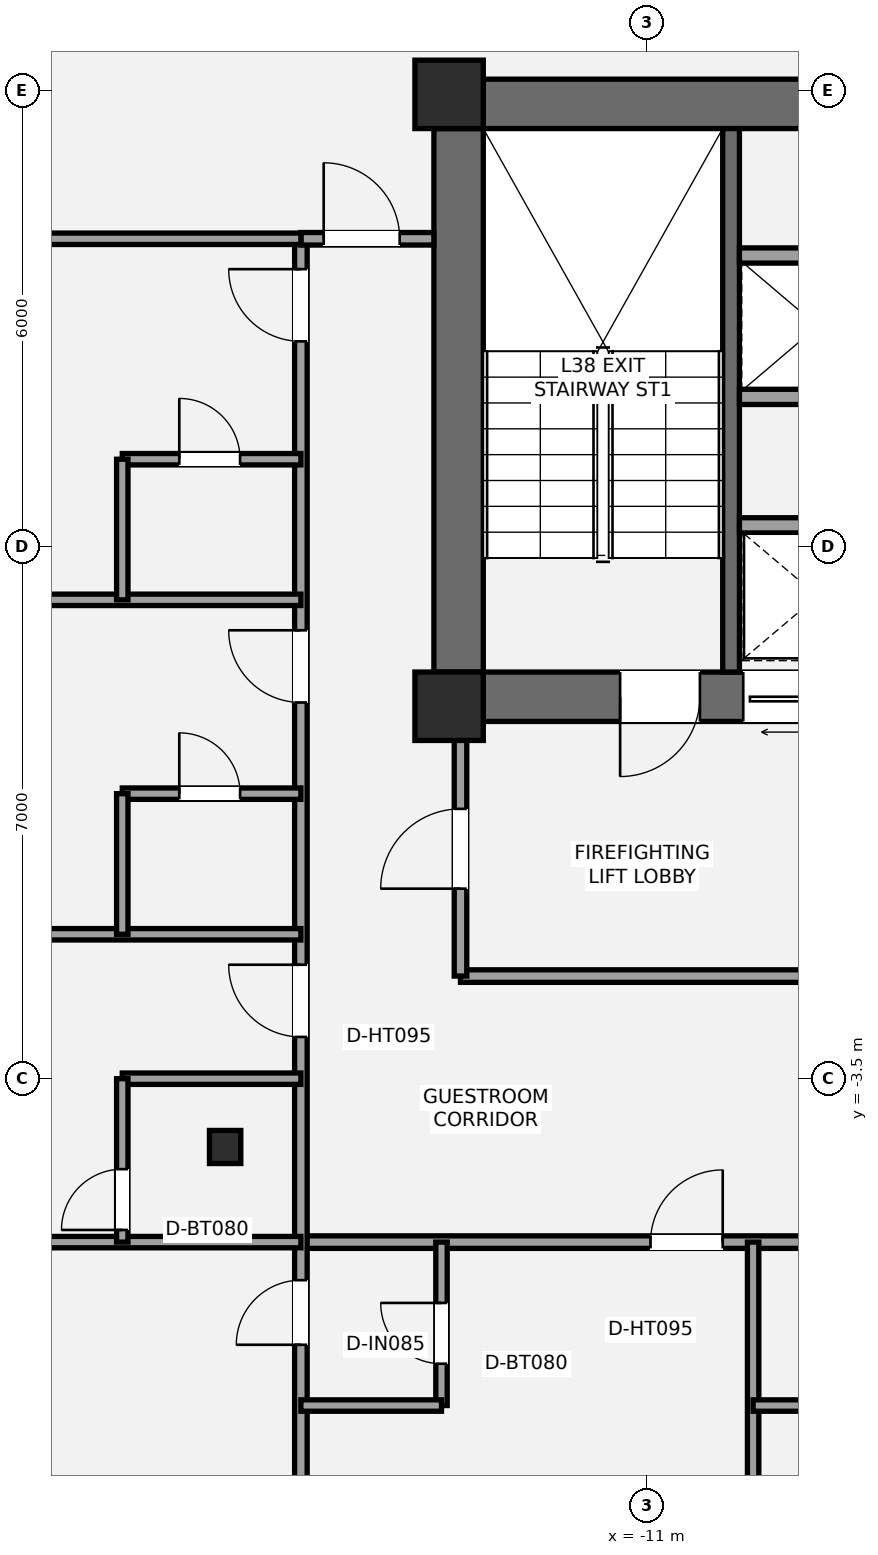
"""IFC4 building model, lengths in metres.
Left out: names, types, materials, properties, quantities, classifications, styles, units other than length and angle.
Written with IfcOpenShell. Run it as: python <this file> out.ifc"""

import sys

from ifc_helpers import new_model, si_unit, direction, frame, frame_2d, origin, origin_2d, place, context, subcontext, project, spatial, rectangle, i_section, extrude, element, fill, save


model = new_model("IFC4")
c1 = context("Model", 3, precision=1e-05, world=origin(), true_north=direction((0.0, 1.0)))
c2 = subcontext(c1, "Body", "Model", "MODEL_VIEW")
j1 = project(units=[si_unit("LENGTHUNIT", "METRE"), si_unit("PLANEANGLEUNIT", "RADIAN")], contexts=[c1])
p1 = place(None, origin())
s1 = spatial("IfcSite", under=j1, at=p1, CompositionType="ELEMENT")
p2 = place(p1, origin())
s2 = spatial("IfcBuilding", under=s1, at=p2, CompositionType="ELEMENT")
p3 = place(p2, frame((0.0, 0.0, 143.8)))
s3 = spatial("IfcBuildingStorey", under=s2, at=p3, CompositionType="ELEMENT", Elevation=143.8)
p4 = place(p3, frame((-13.475, 1.2, 0.0), z_axis=(0.0, 0.0, 1.0), x_axis=(0.0, 1.0, 0.0)))
e1 = element("IfcWall", 1, at=p4, inside=s3, PredefinedType="SHEAR", context=c2, shape_type="SweptSolid", body=[
    extrude(rectangle(XDim=8.45, YDim=0.65, at=frame_2d((4.225, 0.0))), origin(), (0.0, 0.0, 1.0), 3.2),
])
p5 = place(p3, frame((-13.8, 9.325, 0.0), z_axis=(0.0, 0.0, 1.0), x_axis=(1.0, 0.0, 0.0)))
e2 = element("IfcWall", 2, at=p5, inside=s3, PredefinedType="SHEAR", context=c2, shape_type="SweptSolid", body=[
    extrude(rectangle(XDim=9.325, YDim=0.65, at=frame_2d((4.663, 0.0))), origin(), (0.0, 0.0, 1.0), 3.2),
])
p6 = place(p3, frame((-4.875, 1.525, 0.0), z_axis=(0.0, 0.0, 1.0), x_axis=(-1.0, 0.0, 0.0)))
e3 = element("IfcWall", 3, at=p6, inside=s3, PredefinedType="SHEAR", context=c2, shape_type="SweptSolid", body=[
    extrude(rectangle(XDim=8.925, YDim=0.65, at=frame_2d((4.462, 0.0))), origin(), (0.0, 0.0, 1.0), 3.2),
])
p7 = place(p6, frame((5.425, 0.0, 0.0)))
e4 = element("IfcOpeningElement", 4, at=p7, cuts=e3, PredefinedType="OPENING", context=c2, shape_type="SweptSolid", body=[
    extrude(rectangle(XDim=1.05, YDim=2.15, at=frame_2d((0.525, 1.075))), frame((0.0, 0.335, 0.0), z_axis=(0.0, -1.0, 0.0), x_axis=(1.0, 0.0, 0.0)), (0.0, 0.0, 1.0), 0.67),
])
p8 = place(p6, frame((3.755, 0.0, 0.0)))
e5 = element("IfcOpeningElement", 5, at=p8, cuts=e3, PredefinedType="OPENING", context=c2, shape_type="SweptSolid", body=[
    extrude(rectangle(XDim=1.1, YDim=2.2, at=frame_2d((0.55, 1.1))), frame((0.0, 0.335, 0.0), z_axis=(0.0, -1.0, 0.0), x_axis=(1.0, 0.0, 0.0)), (0.0, 0.0, 1.0), 0.67),
])
p9 = place(p3, frame((-9.89, 1.85, 0.0), z_axis=(0.0, 0.0, 1.0), x_axis=(0.0, 1.0, 0.0)))
e6 = element("IfcWall", 6, at=p9, inside=s3, PredefinedType="SHEAR", context=c2, shape_type="SweptSolid", body=[
    extrude(rectangle(XDim=7.15, YDim=0.22, at=frame_2d((3.575, 0.0))), origin(), (0.0, 0.0, 1.0), 3.2),
])
for number, where, z_axis, x_axis in (
    (7, (-13.6, 1.4, 0.0), (0.0, 0.0, 1.0), (1.0, 0.0, 0.0)),
    (8, (-13.6, 9.45, 0.0), (0.0, 0.0, 1.0), (1.0, 0.0, 0.0)),
):
    element("IfcColumn", number, at=place(p3, frame(where, z_axis=z_axis, x_axis=x_axis)), inside=s3, PredefinedType="COLUMN", context=c2, shape_type="SweptSolid", body=[
        extrude(rectangle(XDim=0.9, YDim=0.9, at=origin_2d()), origin(), (0.0, 0.0, 1.0), 3.2),
    ])
p10 = place(p3, frame((-16.547, -4.398, 0.0), z_axis=(0.0, 0.0, 1.0), x_axis=(1.0, 0.0, 0.0)))
e9 = element("IfcColumn", 9, at=p10, inside=s3, PredefinedType="COLUMN", context=c2, shape_type="SweptSolid", body=[
    extrude(i_section(OverallWidth=0.412, OverallDepth=0.435, WebThickness=0.036, FlangeThickness=0.057, at=origin_2d()), origin(), (0.0, 0.0, 1.0), 3.2),
])
p11 = place(p3, frame((-13.45, -2.15, 0.0), z_axis=(0.0, 0.0, 1.0), x_axis=(1.0, 0.0, 0.0)))
e10 = element("IfcWall", 10, at=p11, inside=s3, PredefinedType="PARTITIONING", context=c2, shape_type="SweptSolid", body=[
    extrude(rectangle(XDim=6.25, YDim=0.165, at=frame_2d((3.125, 0.0))), origin(), (0.0, 0.0, 1.0), 2.473),
])
p12 = place(p3, frame((-13.45, -2.15, 0.0), z_axis=(0.0, 0.0, 1.0), x_axis=(0.0, 1.0, 0.0)))
e11 = element("IfcWall", 11, at=p12, inside=s3, PredefinedType="PARTITIONING", context=c2, shape_type="SweptSolid", body=[
    extrude(rectangle(XDim=3.4, YDim=0.165, at=frame_2d((1.7, 0.0))), origin(), (0.0, 0.0, 1.0), 2.473),
])
p13 = place(p12, frame((1.15, 0.0, 0.0)))
e12 = element("IfcOpeningElement", 12, at=p13, cuts=e11, PredefinedType="OPENING", context=c2, shape_type="SweptSolid", body=[
    extrude(rectangle(XDim=1.05, YDim=2.15, at=frame_2d((0.525, 1.075))), frame((0.0, 0.093, 0.0), z_axis=(0.0, -1.0, 0.0), x_axis=(1.0, 0.0, 0.0)), (0.0, 0.0, 1.0), 0.185),
])
for number, where, z_axis, x_axis in (
    (13, (-9.78, 3.78, 0.0), (0.0, 0.0, 1.0), (1.0, 0.0, 0.0)),
    (14, (-9.78, 5.47, 0.0), (0.0, 0.0, 1.0), (1.0, 0.0, 0.0)),
    (15, (-9.78, 7.33, 0.0), (0.0, 0.0, 1.0), (1.0, 0.0, 0.0)),
):
    element("IfcWall", number, at=place(p3, frame(where, z_axis=z_axis, x_axis=x_axis)), inside=s3, PredefinedType="SOLIDWALL", context=c2, shape_type="SweptSolid", body=[
        extrude(rectangle(XDim=4.255, YDim=0.2, at=frame_2d((2.127, 0.0))), origin(), (0.0, 0.0, 1.0), 3.02),
    ])
p14 = place(p3, frame((-15.55, -5.65, 0.0), z_axis=(0.0, 0.0, 1.0), x_axis=(1.0, 0.0, 0.0)))
e16 = element("IfcWall", 16, at=p14, inside=s3, PredefinedType="PARTITIONING", context=c2, shape_type="SweptSolid", body=[
    extrude(rectangle(XDim=31.1, YDim=0.165, at=frame_2d((15.55, 0.0))), origin(), (0.0, 0.0, 1.0), 2.398),
])
p15 = place(p14, frame((4.6, 0.0, 0.0)))
e17 = element("IfcOpeningElement", 17, at=p15, cuts=e16, PredefinedType="OPENING", context=c2, shape_type="SweptSolid", body=[
    extrude(rectangle(XDim=0.95, YDim=2.15, at=frame_2d((0.475, 1.075))), frame((0.0, 0.093, 0.0), z_axis=(0.0, -1.0, 0.0), x_axis=(1.0, 0.0, 0.0)), (0.0, 0.0, 1.0), 0.185),
])
p16 = place(p14, frame((11.0, 0.0, 0.0)))
e18 = element("IfcOpeningElement", 18, at=p16, cuts=e16, PredefinedType="OPENING", context=c2, shape_type="SweptSolid", body=[
    extrude(rectangle(XDim=0.95, YDim=2.15, at=frame_2d((0.475, 1.075))), frame((0.0, 0.093, 0.0), z_axis=(0.0, -1.0, 0.0), x_axis=(1.0, 0.0, 0.0)), (0.0, 0.0, 1.0), 0.185),
])
p17 = place(p14, frame((17.4, 0.0, 0.0)))
e19 = element("IfcOpeningElement", 19, at=p17, cuts=e16, PredefinedType="OPENING", context=c2, shape_type="SweptSolid", body=[
    extrude(rectangle(XDim=0.95, YDim=2.15, at=frame_2d((0.475, 1.075))), frame((0.0, 0.093, 0.0), z_axis=(0.0, -1.0, 0.0), x_axis=(1.0, 0.0, 0.0)), (0.0, 0.0, 1.0), 0.185),
])
p18 = place(p14, frame((23.8, 0.0, 0.0)))
e20 = element("IfcOpeningElement", 20, at=p18, cuts=e16, PredefinedType="OPENING", context=c2, shape_type="SweptSolid", body=[
    extrude(rectangle(XDim=0.95, YDim=2.15, at=frame_2d((0.475, 1.075))), frame((0.0, 0.093, 0.0), z_axis=(0.0, -1.0, 0.0), x_axis=(1.0, 0.0, 0.0)), (0.0, 0.0, 1.0), 0.185),
])
p19 = place(p14, frame((29.75, 0.0, 0.0)))
e21 = element("IfcOpeningElement", 21, at=p19, cuts=e16, PredefinedType="OPENING", context=c2, shape_type="SweptSolid", body=[
    extrude(rectangle(XDim=0.95, YDim=2.15, at=frame_2d((0.475, 1.075))), frame((0.0, 0.093, 0.0), z_axis=(0.0, -1.0, 0.0), x_axis=(1.0, 0.0, 0.0)), (0.0, 0.0, 1.0), 0.185),
])
p20 = place(p3, frame((-15.55, -13.965, 0.0), z_axis=(0.0, 0.0, 1.0), x_axis=(0.0, 1.0, 0.0)))
e22 = element("IfcWall", 22, at=p20, inside=s3, PredefinedType="PARTITIONING", context=c2, shape_type="SweptSolid", body=[
    extrude(rectangle(XDim=21.515, YDim=0.165, at=frame_2d((10.757, 0.0))), origin(), (0.0, 0.0, 1.0), 2.473),
])
p21 = place(p20, frame((6.964, 0.0, 0.0)))
e23 = element("IfcOpeningElement", 23, at=p21, cuts=e22, PredefinedType="OPENING", context=c2, shape_type="SweptSolid", body=[
    extrude(rectangle(XDim=0.85, YDim=2.1, at=frame_2d((0.425, 1.05))), frame((0.0, 0.093, 0.0), z_axis=(0.0, -1.0, 0.0), x_axis=(1.0, 0.0, 0.0)), (0.0, 0.0, 1.0), 0.185),
])
p22 = place(p20, frame((11.014, 0.0, 0.0)))
e24 = element("IfcOpeningElement", 24, at=p22, cuts=e22, PredefinedType="OPENING", context=c2, shape_type="SweptSolid", body=[
    extrude(rectangle(XDim=0.95, YDim=2.15, at=frame_2d((0.475, 1.075))), frame((0.0, 0.093, 0.0), z_axis=(0.0, -1.0, 0.0), x_axis=(1.0, 0.0, 0.0)), (0.0, 0.0, 1.0), 0.185),
])
p23 = place(p20, frame((15.414, 0.0, 0.0)))
e25 = element("IfcOpeningElement", 25, at=p23, cuts=e22, PredefinedType="OPENING", context=c2, shape_type="SweptSolid", body=[
    extrude(rectangle(XDim=0.95, YDim=2.15, at=frame_2d((0.475, 1.075))), frame((0.0, 0.093, 0.0), z_axis=(0.0, -1.0, 0.0), x_axis=(1.0, 0.0, 0.0)), (0.0, 0.0, 1.0), 0.185),
])
p24 = place(p20, frame((20.165, 0.0, 0.0)))
e26 = element("IfcOpeningElement", 26, at=p24, cuts=e22, PredefinedType="OPENING", context=c2, shape_type="SweptSolid", body=[
    extrude(rectangle(XDim=0.95, YDim=2.15, at=frame_2d((0.475, 1.075))), frame((0.0, 0.093, 0.0), z_axis=(0.0, -1.0, 0.0), x_axis=(1.0, 0.0, 0.0)), (0.0, 0.0, 1.0), 0.185),
])
p25 = place(p3, frame((-15.55, 7.55, 0.0), z_axis=(0.0, 0.0, 1.0), x_axis=(1.0, 0.0, 0.0)))
e27 = element("IfcWall", 27, at=p25, inside=s3, PredefinedType="PARTITIONING", context=c2, shape_type="SweptSolid", body=[
    extrude(rectangle(XDim=1.75, YDim=0.165, at=frame_2d((0.875, 0.0))), origin(), (0.0, 0.0, 1.0), 2.473),
])
p26 = place(p25, frame((0.3, 0.0, 0.0)))
e28 = element("IfcOpeningElement", 28, at=p26, cuts=e27, PredefinedType="OPENING", context=c2, shape_type="SweptSolid", body=[
    extrude(rectangle(XDim=1.0, YDim=2.15, at=frame_2d((0.5, 1.075))), frame((0.0, 0.093, 0.0), z_axis=(0.0, -1.0, 0.0), x_axis=(1.0, 0.0, 0.0)), (0.0, 0.0, 1.0), 0.185),
])
p27 = place(p3, frame((-22.804, 7.55, 0.0), z_axis=(0.0, 0.0, 1.0), x_axis=(1.0, 0.0, 0.0)))
e29 = element("IfcWall", 29, at=p27, inside=s3, PredefinedType="PLUMBINGWALL", context=c2, shape_type="SweptSolid", body=[
    extrude(rectangle(XDim=7.254, YDim=0.15, at=frame_2d((3.627, 0.0))), origin(), (0.0, 0.0, 1.0), 2.473),
])
p28 = place(p3, frame((-23.513, -5.65, 0.0), z_axis=(0.0, 0.0, 1.0), x_axis=(1.0, 0.0, 0.0)))
e30 = element("IfcWall", 30, at=p28, inside=s3, PredefinedType="PLUMBINGWALL", context=c2, shape_type="SweptSolid", body=[
    extrude(rectangle(XDim=7.963, YDim=0.15, at=frame_2d((3.981, 0.0))), origin(), (0.0, 0.0, 1.0), 2.473),
])
p29 = place(p3, frame((-9.6, -15.591, 0.0), z_axis=(0.0, 0.0, 1.0), x_axis=(0.0, 1.0, 0.0)))
e31 = element("IfcWall", 31, at=p29, inside=s3, PredefinedType="PLUMBINGWALL", context=c2, shape_type="SweptSolid", body=[
    extrude(rectangle(XDim=9.941, YDim=0.15, at=frame_2d((4.97, 0.0))), origin(), (0.0, 0.0, 1.0), 3.02),
])
p30 = place(p3, frame((-13.7, -7.8, 0.0), z_axis=(0.0, 0.0, 1.0), x_axis=(0.0, 1.0, 0.0)))
e32 = element("IfcWall", 32, at=p30, inside=s3, PredefinedType="PLUMBINGWALL", context=c2, shape_type="SweptSolid", body=[
    extrude(rectangle(XDim=2.15, YDim=0.15, at=frame_2d((1.075, 0.0))), origin(), (0.0, 0.0, 1.0), 3.02),
])
p31 = place(p30, frame((0.55, 0.0, 0.0)))
e33 = element("IfcOpeningElement", 33, at=p31, cuts=e32, PredefinedType="OPENING", context=c2, shape_type="SweptSolid", body=[
    extrude(rectangle(XDim=0.8, YDim=2.1, at=frame_2d((0.4, 1.05))), frame((0.0, 0.085, 0.0), z_axis=(0.0, -1.0, 0.0), x_axis=(1.0, 0.0, 0.0)), (0.0, 0.0, 1.0), 0.17),
])
for number, where, z_axis, x_axis in (
    (34, (-15.55, -7.8, 0.0), (0.0, 0.0, 1.0), (1.0, 0.0, 0.0)),
    (35, (-9.6, -7.8, 0.0), (0.0, 0.0, 1.0), (1.0, 0.0, 0.0)),
):
    element("IfcWall", number, at=place(p3, frame(where, z_axis=z_axis, x_axis=x_axis)), inside=s3, PredefinedType="PLUMBINGWALL", context=c2, shape_type="SweptSolid", body=[
        extrude(rectangle(XDim=1.85, YDim=0.15, at=frame_2d((0.925, 0.0))), origin(), (0.0, 0.0, 1.0), 3.02),
    ])
p32 = place(p3, frame((-24.184, -1.6, 0.0), z_axis=(0.0, 0.0, 1.0), x_axis=(1.0, 0.0, 0.0)))
e36 = element("IfcWall", 36, at=p32, inside=s3, PredefinedType="PLUMBINGWALL", context=c2, shape_type="SweptSolid", body=[
    extrude(rectangle(XDim=8.634, YDim=0.15, at=frame_2d((4.317, 0.0))), origin(), (0.0, 0.0, 1.0), 2.398),
])
p33 = place(p3, frame((-24.045, 2.8, 0.0), z_axis=(0.0, 0.0, 1.0), x_axis=(1.0, 0.0, 0.0)))
e37 = element("IfcWall", 37, at=p33, inside=s3, PredefinedType="PLUMBINGWALL", context=c2, shape_type="SweptSolid", body=[
    extrude(rectangle(XDim=8.495, YDim=0.15, at=frame_2d((4.247, 0.0))), origin(), (0.0, 0.0, 1.0), 2.473),
])
p34 = place(p3, frame((-17.9, -3.5, 0.0), z_axis=(0.0, 0.0, 1.0), x_axis=(1.0, 0.0, 0.0)))
e38 = element("IfcWall", 38, at=p34, inside=s3, PredefinedType="PLUMBINGWALL", context=c2, shape_type="SweptSolid", body=[
    extrude(rectangle(XDim=2.35, YDim=0.15, at=frame_2d((1.175, 0.0))), origin(), (0.0, 0.0, 1.0), 2.398),
])
p35 = place(p3, frame((-17.9, -5.65, 0.0), z_axis=(0.0, 0.0, 1.0), x_axis=(0.0, 1.0, 0.0)))
e39 = element("IfcWall", 39, at=p35, inside=s3, PredefinedType="PLUMBINGWALL", context=c2, shape_type="SweptSolid", body=[
    extrude(rectangle(XDim=2.15, YDim=0.15, at=frame_2d((1.075, 0.0))), origin(), (0.0, 0.0, 1.0), 2.473),
])
p36 = place(p35, frame((0.16, 0.0, 0.0)))
e40 = element("IfcOpeningElement", 40, at=p36, cuts=e39, PredefinedType="OPENING", context=c2, shape_type="SweptSolid", body=[
    extrude(rectangle(XDim=0.8, YDim=2.1, at=frame_2d((0.4, 1.05))), frame((0.0, 0.085, 0.0), z_axis=(0.0, -1.0, 0.0), x_axis=(1.0, 0.0, 0.0)), (0.0, 0.0, 1.0), 0.17),
])
p37 = place(p3, frame((-17.9, 0.25, 0.0), z_axis=(0.0, 0.0, 1.0), x_axis=(1.0, 0.0, 0.0)))
e41 = element("IfcWall", 41, at=p37, inside=s3, PredefinedType="PLUMBINGWALL", context=c2, shape_type="SweptSolid", body=[
    extrude(rectangle(XDim=2.35, YDim=0.15, at=frame_2d((1.175, 0.0))), origin(), (0.0, 0.0, 1.0), 2.473),
])
p38 = place(p37, frame((0.75, 0.0, 0.0)))
e42 = element("IfcOpeningElement", 42, at=p38, cuts=e41, PredefinedType="OPENING", context=c2, shape_type="SweptSolid", body=[
    extrude(rectangle(XDim=0.8, YDim=2.1, at=frame_2d((0.4, 1.05))), frame((0.0, 0.085, 0.0), z_axis=(0.0, -1.0, 0.0), x_axis=(1.0, 0.0, 0.0)), (0.0, 0.0, 1.0), 0.17),
])
p39 = place(p3, frame((-17.9, -1.6, 0.0), z_axis=(0.0, 0.0, 1.0), x_axis=(0.0, 1.0, 0.0)))
e43 = element("IfcWall", 43, at=p39, inside=s3, PredefinedType="PLUMBINGWALL", context=c2, shape_type="SweptSolid", body=[
    extrude(rectangle(XDim=1.85, YDim=0.15, at=frame_2d((0.925, 0.0))), origin(), (0.0, 0.0, 1.0), 3.02),
])
p40 = place(p3, frame((-17.9, 4.65, 0.0), z_axis=(0.0, 0.0, 1.0), x_axis=(1.0, 0.0, 0.0)))
e44 = element("IfcWall", 44, at=p40, inside=s3, PredefinedType="PLUMBINGWALL", context=c2, shape_type="SweptSolid", body=[
    extrude(rectangle(XDim=2.35, YDim=0.15, at=frame_2d((1.175, 0.0))), origin(), (0.0, 0.0, 1.0), 2.473),
])
p41 = place(p40, frame((0.75, 0.0, 0.0)))
e45 = element("IfcOpeningElement", 45, at=p41, cuts=e44, PredefinedType="OPENING", context=c2, shape_type="SweptSolid", body=[
    extrude(rectangle(XDim=0.8, YDim=2.1, at=frame_2d((0.4, 1.05))), frame((0.0, 0.085, 0.0), z_axis=(0.0, -1.0, 0.0), x_axis=(1.0, 0.0, 0.0)), (0.0, 0.0, 1.0), 0.17),
])
p42 = place(p3, frame((-17.9, 2.8, 0.0), z_axis=(0.0, 0.0, 1.0), x_axis=(0.0, 1.0, 0.0)))
e46 = element("IfcWall", 46, at=p42, inside=s3, PredefinedType="PLUMBINGWALL", context=c2, shape_type="SweptSolid", body=[
    extrude(rectangle(XDim=1.85, YDim=0.15, at=frame_2d((0.925, 0.0))), origin(), (0.0, 0.0, 1.0), 3.02),
])
p43 = place(p7, origin())
e47 = element("IfcDoor", 47, at=p43, inside=s3, OperationType="SINGLE_SWING_RIGHT", PredefinedType="DOOR", context=c2, shape_type="SweptSolid", body=[
    extrude(rectangle(XDim=1.05, YDim=2.15, at=frame_2d((0.525, 1.075))), frame((0.0, 0.025, 0.0), z_axis=(0.0, -1.0, 0.0), x_axis=(1.0, 0.0, 0.0)), (0.0, 0.0, 1.0), 0.05),
])
fill(e4, e47)
p44 = place(p13, origin())
e48 = element("IfcDoor", 48, at=p44, inside=s3, OperationType="SINGLE_SWING_LEFT", PredefinedType="DOOR", context=c2, shape_type="SweptSolid", body=[
    extrude(rectangle(XDim=1.05, YDim=2.15, at=frame_2d((0.525, 1.075))), frame((0.0, 0.025, 0.0), z_axis=(0.0, -1.0, 0.0), x_axis=(1.0, 0.0, 0.0)), (0.0, 0.0, 1.0), 0.05),
])
fill(e12, e48)
p45 = place(p8, origin())
e49 = element("IfcDoor", 49, at=p45, inside=s3, OperationType="SLIDING_TO_LEFT", PredefinedType="DOOR", context=c2, shape_type="SweptSolid", body=[
    extrude(rectangle(XDim=1.1, YDim=2.2, at=frame_2d((0.55, 1.1))), frame((0.0, 0.025, 0.0), z_axis=(0.0, -1.0, 0.0), x_axis=(1.0, 0.0, 0.0)), (0.0, 0.0, 1.0), 0.05),
])
fill(e5, e49)
p46 = place(p26, origin())
e50 = element("IfcDoor", 50, at=p46, inside=s3, OperationType="SINGLE_SWING_LEFT", PredefinedType="DOOR", context=c2, shape_type="SweptSolid", body=[
    extrude(rectangle(XDim=1.0, YDim=2.15, at=frame_2d((0.5, 1.075))), frame((0.0, 0.025, 0.0), z_axis=(0.0, -1.0, 0.0), x_axis=(1.0, 0.0, 0.0)), (0.0, 0.0, 1.0), 0.05),
])
fill(e28, e50)
p47 = place(p21, origin())
e51 = element("IfcDoor", 51, at=p47, inside=s3, OperationType="SINGLE_SWING_LEFT", PredefinedType="DOOR", context=c2, shape_type="SweptSolid", body=[
    extrude(rectangle(XDim=0.85, YDim=2.1, at=frame_2d((0.425, 1.05))), frame((0.0, 0.025, 0.0), z_axis=(0.0, -1.0, 0.0), x_axis=(1.0, 0.0, 0.0)), (0.0, 0.0, 1.0), 0.05),
])
fill(e23, e51)
p48 = place(p15, origin())
e52 = element("IfcDoor", 52, at=p48, inside=s3, OperationType="SINGLE_SWING_RIGHT", PredefinedType="DOOR", context=c2, shape_type="SweptSolid", body=[
    extrude(rectangle(XDim=0.95, YDim=2.15, at=frame_2d((0.475, 1.075))), frame((0.0, 0.025, 0.0), z_axis=(0.0, -1.0, 0.0), x_axis=(1.0, 0.0, 0.0)), (0.0, 0.0, 1.0), 0.05),
])
fill(e17, e52)
p49 = place(p31, origin())
e53 = element("IfcDoor", 53, at=p49, inside=s3, OperationType="SINGLE_SWING_RIGHT", PredefinedType="DOOR", context=c2, shape_type="SweptSolid", body=[
    extrude(rectangle(XDim=0.8, YDim=2.1, at=frame_2d((0.4, 1.05))), frame((0.0, 0.025, 0.0), z_axis=(0.0, -1.0, 0.0), x_axis=(1.0, 0.0, 0.0)), (0.0, 0.0, 1.0), 0.05),
])
fill(e33, e53)
p50 = place(p22, origin())
e54 = element("IfcDoor", 54, at=p50, inside=s3, OperationType="SINGLE_SWING_RIGHT", PredefinedType="DOOR", context=c2, shape_type="SweptSolid", body=[
    extrude(rectangle(XDim=0.95, YDim=2.15, at=frame_2d((0.475, 1.075))), frame((0.0, 0.025, 0.0), z_axis=(0.0, -1.0, 0.0), x_axis=(1.0, 0.0, 0.0)), (0.0, 0.0, 1.0), 0.05),
])
fill(e24, e54)
p51 = place(p36, origin())
e55 = element("IfcDoor", 55, at=p51, inside=s3, OperationType="SINGLE_SWING_LEFT", PredefinedType="DOOR", context=c2, shape_type="SweptSolid", body=[
    extrude(rectangle(XDim=0.8, YDim=2.1, at=frame_2d((0.4, 1.05))), frame((0.0, 0.025, 0.0), z_axis=(0.0, -1.0, 0.0), x_axis=(1.0, 0.0, 0.0)), (0.0, 0.0, 1.0), 0.05),
])
fill(e40, e55)
p52 = place(p23, origin())
e56 = element("IfcDoor", 56, at=p52, inside=s3, OperationType="SINGLE_SWING_RIGHT", PredefinedType="DOOR", context=c2, shape_type="SweptSolid", body=[
    extrude(rectangle(XDim=0.95, YDim=2.15, at=frame_2d((0.475, 1.075))), frame((0.0, 0.025, 0.0), z_axis=(0.0, -1.0, 0.0), x_axis=(1.0, 0.0, 0.0)), (0.0, 0.0, 1.0), 0.05),
])
fill(e25, e56)
p53 = place(p38, origin())
e57 = element("IfcDoor", 57, at=p53, inside=s3, OperationType="SINGLE_SWING_LEFT", PredefinedType="DOOR", context=c2, shape_type="SweptSolid", body=[
    extrude(rectangle(XDim=0.8, YDim=2.1, at=frame_2d((0.4, 1.05))), frame((0.0, 0.025, 0.0), z_axis=(0.0, -1.0, 0.0), x_axis=(1.0, 0.0, 0.0)), (0.0, 0.0, 1.0), 0.05),
])
fill(e42, e57)
p54 = place(p24, origin())
e58 = element("IfcDoor", 58, at=p54, inside=s3, OperationType="SINGLE_SWING_RIGHT", PredefinedType="DOOR", context=c2, shape_type="SweptSolid", body=[
    extrude(rectangle(XDim=0.95, YDim=2.15, at=frame_2d((0.475, 1.075))), frame((0.0, 0.025, 0.0), z_axis=(0.0, -1.0, 0.0), x_axis=(1.0, 0.0, 0.0)), (0.0, 0.0, 1.0), 0.05),
])
fill(e26, e58)
p55 = place(p41, origin())
e59 = element("IfcDoor", 59, at=p55, inside=s3, OperationType="SINGLE_SWING_LEFT", PredefinedType="DOOR", context=c2, shape_type="SweptSolid", body=[
    extrude(rectangle(XDim=0.8, YDim=2.1, at=frame_2d((0.4, 1.05))), frame((0.0, 0.025, 0.0), z_axis=(0.0, -1.0, 0.0), x_axis=(1.0, 0.0, 0.0)), (0.0, 0.0, 1.0), 0.05),
])
fill(e45, e59)
save(model, sys.argv[1])
